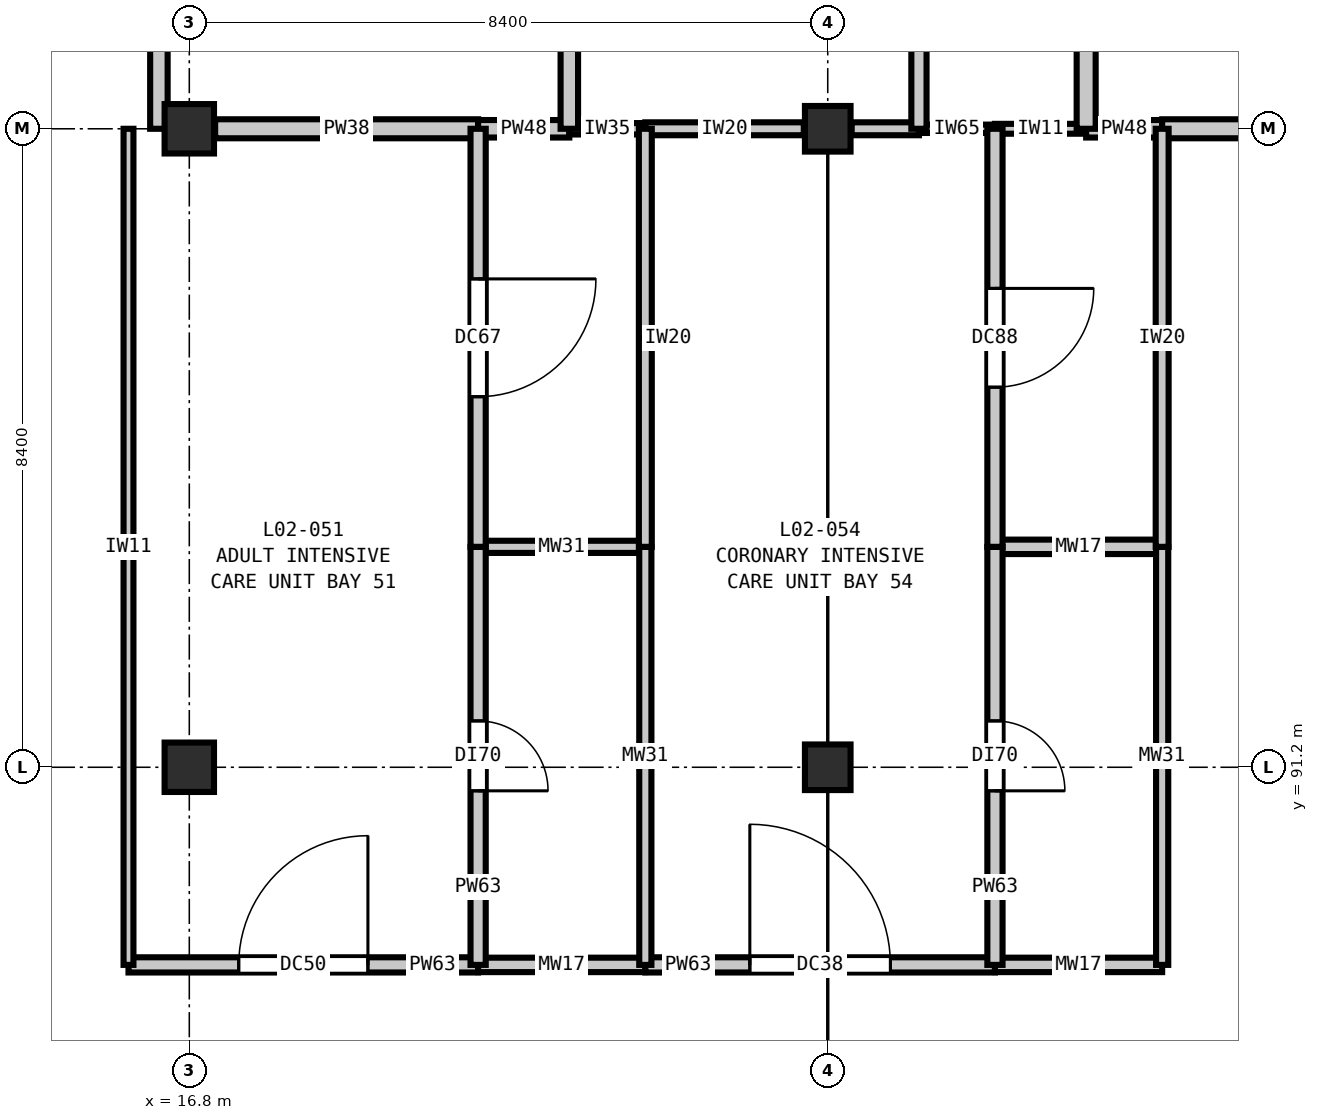
"""IFC4 building model, lengths in metres.
Left out: names, types, materials, properties, quantities, classifications, styles, units other than length and angle.
Written with IfcOpenShell. Run it as: python <this file> out.ifc"""

import sys

from ifc_helpers import new_model, si_unit, direction, frame, frame_2d, origin, origin_2d, place, context, subcontext, project, spatial, rectangle, extrude, element, fill, save


model = new_model("IFC4")
c1 = context("Model", 3, precision=1e-05, world=origin(), true_north=direction((0.0, 1.0)))
c2 = subcontext(c1, "Body", "Model", "MODEL_VIEW")
j1 = project(units=[si_unit("LENGTHUNIT", "METRE"), si_unit("PLANEANGLEUNIT", "RADIAN")], contexts=[c1])
p1 = place(None, origin())
s1 = spatial("IfcSite", under=j1, at=p1, CompositionType="ELEMENT")
p2 = place(p1, origin())
s2 = spatial("IfcBuilding", under=s1, at=p2, CompositionType="ELEMENT")
p3 = place(p2, frame((0.0, 0.0, 10.8)))
s3 = spatial("IfcBuildingStorey", under=s2, at=p3, CompositionType="ELEMENT", Elevation=10.8)
for number, where, z_axis, x_axis in (
    (1, (16.8, 91.2, 0.0), (0.0, 0.0, 1.0), (1.0, 0.0, 0.0)),
    (2, (16.8, 99.6, 0.0), (0.0, 0.0, 1.0), (1.0, 0.0, 0.0)),
):
    element("IfcColumn", number, at=place(p3, frame(where, z_axis=z_axis, x_axis=x_axis)), inside=s3, PredefinedType="COLUMN", context=c2, shape_type="SweptSolid", body=[
        extrude(rectangle(XDim=0.65, YDim=0.65, at=origin_2d()), origin(), (0.0, 0.0, 1.0), 5.4),
    ])
for number, where, z_axis, x_axis in (
    (3, (25.2, 91.2, 0.0), (0.0, 0.0, 1.0), (1.0, 0.0, 0.0)),
    (4, (25.2, 99.6, 0.0), (0.0, 0.0, 1.0), (1.0, 0.0, 0.0)),
):
    element("IfcColumn", number, at=place(p3, frame(where, z_axis=z_axis, x_axis=x_axis)), inside=s3, PredefinedType="COLUMN", context=c2, shape_type="SweptSolid", body=[
        extrude(rectangle(XDim=0.6, YDim=0.6, at=origin_2d()), origin(), (0.0, 0.0, 1.0), 5.4),
    ])
p4 = place(p3, frame((16.0, 88.6, 0.0), z_axis=(0.0, 0.0, 1.0), x_axis=(1.0, 0.0, 0.0)))
e5 = element("IfcWall", 5, at=p4, inside=s3, PredefinedType="PARTITIONING", context=c2, shape_type="SweptSolid", body=[
    extrude(rectangle(XDim=4.6, YDim=0.2, at=frame_2d((2.3, 0.0))), origin(), (0.0, 0.0, 1.0), 5.07),
])
p5 = place(p4, frame((1.45, 0.0, 0.0)))
e6 = element("IfcOpeningElement", 6, at=p5, cuts=e5, PredefinedType="OPENING", context=c2, shape_type="SweptSolid", body=[
    extrude(rectangle(XDim=1.7, YDim=2.3, at=frame_2d((0.85, 1.15))), frame((0.0, 0.11, 0.0), z_axis=(0.0, -1.0, 0.0), x_axis=(1.0, 0.0, 0.0)), (0.0, 0.0, 1.0), 0.22),
])
p6 = place(p3, frame((20.6, 88.6, 0.0), z_axis=(0.0, 0.0, 1.0), x_axis=(1.0, 0.0, 0.0)))
e7 = element("IfcWall", 7, at=p6, inside=s3, PredefinedType="PLUMBINGWALL", context=c2, shape_type="SweptSolid", body=[
    extrude(rectangle(XDim=2.2, YDim=0.19, at=frame_2d((1.1, 0.0))), origin(), (0.0, 0.0, 1.0), 5.07),
])
p7 = place(p3, frame((22.8, 88.6, 0.0), z_axis=(0.0, 0.0, 1.0), x_axis=(1.0, 0.0, 0.0)))
e8 = element("IfcWall", 8, at=p7, inside=s3, PredefinedType="PARTITIONING", context=c2, shape_type="SweptSolid", body=[
    extrude(rectangle(XDim=4.6, YDim=0.2, at=frame_2d((2.3, 0.0))), origin(), (0.0, 0.0, 1.0), 5.07),
])
p8 = place(p7, frame((1.375, 0.0, 0.0)))
e9 = element("IfcOpeningElement", 9, at=p8, cuts=e8, PredefinedType="OPENING", context=c2, shape_type="SweptSolid", body=[
    extrude(rectangle(XDim=1.85, YDim=2.3, at=frame_2d((0.925, 1.15))), frame((0.0, 0.11, 0.0), z_axis=(0.0, -1.0, 0.0), x_axis=(1.0, 0.0, 0.0)), (0.0, 0.0, 1.0), 0.22),
])
p9 = place(p3, frame((27.4, 88.6, 0.0), z_axis=(0.0, 0.0, 1.0), x_axis=(1.0, 0.0, 0.0)))
e10 = element("IfcWall", 10, at=p9, inside=s3, PredefinedType="PLUMBINGWALL", context=c2, shape_type="SweptSolid", body=[
    extrude(rectangle(XDim=2.2, YDim=0.19, at=frame_2d((1.1, 0.0))), origin(), (0.0, 0.0, 1.0), 5.07),
])
p10 = place(p3, frame((20.6, 94.1, 0.0), z_axis=(0.0, 0.0, 1.0), x_axis=(1.0, 0.0, 0.0)))
e11 = element("IfcWall", 11, at=p10, inside=s3, PredefinedType="PLUMBINGWALL", context=c2, shape_type="SweptSolid", body=[
    extrude(rectangle(XDim=2.2, YDim=0.16, at=frame_2d((1.1, 0.0))), origin(), (0.0, 0.0, 1.0), 5.07),
])
p11 = place(p3, frame((27.4, 94.1, 0.0), z_axis=(0.0, 0.0, 1.0), x_axis=(1.0, 0.0, 0.0)))
e12 = element("IfcWall", 12, at=p11, inside=s3, PredefinedType="PLUMBINGWALL", context=c2, shape_type="SweptSolid", body=[
    extrude(rectangle(XDim=2.2, YDim=0.19, at=frame_2d((1.1, 0.0))), origin(), (0.0, 0.0, 1.0), 5.07),
])
p12 = place(p3, frame((17.14, 99.6, 0.0), z_axis=(0.0, 0.0, 1.0), x_axis=(1.0, 0.0, 0.0)))
e13 = element("IfcWall", 13, at=p12, inside=s3, PredefinedType="PARTITIONING", context=c2, shape_type="SweptSolid", body=[
    extrude(rectangle(XDim=3.46, YDim=0.25, at=frame_2d((1.73, 0.0))), origin(), (0.0, 0.0, 1.0), 4.735),
])
p13 = place(p3, frame((20.6, 99.6, 0.0), z_axis=(0.0, 0.0, 1.0), x_axis=(1.0, 0.0, 0.0)))
e14 = element("IfcWall", 14, at=p13, inside=s3, PredefinedType="PARTITIONING", context=c2, shape_type="SweptSolid", body=[
    extrude(rectangle(XDim=1.2, YDim=0.23, at=frame_2d((0.6, 0.0))), origin(), (0.0, 0.0, 1.0), 4.735),
])
p14 = place(p3, frame((21.8, 99.6, 0.0), z_axis=(0.0, 0.0, 1.0), x_axis=(1.0, 0.0, 0.0)))
e15 = element("IfcWall", 15, at=p14, inside=s3, PredefinedType="PARTITIONING", context=c2, shape_type="SweptSolid", body=[
    extrude(rectangle(XDim=1.0, YDim=0.15, at=frame_2d((0.5, 0.0))), origin(), (0.0, 0.0, 1.0), 4.735),
])
p15 = place(p3, frame((22.8, 99.6, 0.0), z_axis=(0.0, 0.0, 1.0), x_axis=(1.0, 0.0, 0.0)))
e16 = element("IfcWall", 16, at=p15, inside=s3, PredefinedType="PARTITIONING", context=c2, shape_type="SweptSolid", body=[
    extrude(rectangle(XDim=2.085, YDim=0.17, at=frame_2d((1.042, 0.0))), origin(), (0.0, 0.0, 1.0), 4.735),
])
p16 = place(p3, frame((25.515, 99.6, 0.0), z_axis=(0.0, 0.0, 1.0), x_axis=(1.0, 0.0, 0.0)))
e17 = element("IfcWall", 17, at=p16, inside=s3, PredefinedType="PARTITIONING", context=c2, shape_type="SweptSolid", body=[
    extrude(rectangle(XDim=0.885, YDim=0.17, at=frame_2d((0.442, 0.0))), origin(), (0.0, 0.0, 1.0), 4.735),
])
p17 = place(p3, frame((26.4, 99.6, 0.0), z_axis=(0.0, 0.0, 1.0), x_axis=(1.0, 0.0, 0.0)))
e18 = element("IfcWall", 18, at=p17, inside=s3, PredefinedType="PARTITIONING", context=c2, shape_type="SweptSolid", body=[
    extrude(rectangle(XDim=1.0, YDim=0.11, at=frame_2d((0.5, 0.0))), origin(), (0.0, 0.0, 1.0), 4.735),
])
p18 = place(p3, frame((27.4, 99.6, 0.0), z_axis=(0.0, 0.0, 1.0), x_axis=(1.0, 0.0, 0.0)))
e19 = element("IfcWall", 19, at=p18, inside=s3, PredefinedType="PARTITIONING", context=c2, shape_type="SweptSolid", body=[
    extrude(rectangle(XDim=1.2, YDim=0.13, at=frame_2d((0.6, 0.0))), origin(), (0.0, 0.0, 1.0), 4.735),
])
p19 = place(p3, frame((28.6, 99.6, 0.0), z_axis=(0.0, 0.0, 1.0), x_axis=(1.0, 0.0, 0.0)))
e20 = element("IfcWall", 20, at=p19, inside=s3, PredefinedType="PARTITIONING", context=c2, shape_type="SweptSolid", body=[
    extrude(rectangle(XDim=1.0, YDim=0.23, at=frame_2d((0.5, 0.0))), origin(), (0.0, 0.0, 1.0), 4.735),
])
p20 = place(p3, frame((29.6, 99.6, 0.0), z_axis=(0.0, 0.0, 1.0), x_axis=(1.0, 0.0, 0.0)))
e21 = element("IfcWall", 21, at=p20, inside=s3, PredefinedType="PARTITIONING", context=c2, shape_type="SweptSolid", body=[
    extrude(rectangle(XDim=3.685, YDim=0.25, at=frame_2d((1.842, 0.0))), origin(), (0.0, 0.0, 1.0), 4.735),
])
p21 = place(p3, frame((16.0, 88.6, 0.0), z_axis=(0.0, 0.0, 1.0), x_axis=(0.0, 1.0, 0.0)))
e22 = element("IfcWall", 22, at=p21, inside=s3, PredefinedType="PARTITIONING", context=c2, shape_type="SweptSolid", body=[
    extrude(rectangle(XDim=11.0, YDim=0.13, at=frame_2d((5.5, 0.0))), origin(), (0.0, 0.0, 1.0), 5.07),
])
p22 = place(p3, frame((16.4, 99.6, 0.0), z_axis=(0.0, 0.0, 1.0), x_axis=(0.0, 1.0, 0.0)))
e23 = element("IfcWall", 23, at=p22, inside=s3, PredefinedType="PARTITIONING", context=c2, shape_type="SweptSolid", body=[
    extrude(rectangle(XDim=13.6, YDim=0.23, at=frame_2d((6.8, 0.0))), origin(), (0.0, 0.0, 1.0), 5.07),
])
p23 = place(p3, frame((20.6, 88.6, 0.0), z_axis=(0.0, 0.0, 1.0), x_axis=(0.0, 1.0, 0.0)))
e24 = element("IfcWall", 24, at=p23, inside=s3, PredefinedType="PARTITIONING", context=c2, shape_type="SweptSolid", body=[
    extrude(rectangle(XDim=5.5, YDim=0.2, at=frame_2d((2.75, 0.0))), origin(), (0.0, 0.0, 1.0), 5.07),
])
p24 = place(p23, frame((2.29, 0.0, 0.0)))
e25 = element("IfcOpeningElement", 25, at=p24, cuts=e24, PredefinedType="OPENING", context=c2, shape_type="SweptSolid", body=[
    extrude(rectangle(XDim=0.92, YDim=2.1, at=frame_2d((0.46, 1.05))), frame((0.0, 0.11, 0.0), z_axis=(0.0, -1.0, 0.0), x_axis=(1.0, 0.0, 0.0)), (0.0, 0.0, 1.0), 0.22),
])
p25 = place(p3, frame((20.6, 94.1, 0.0), z_axis=(0.0, 0.0, 1.0), x_axis=(0.0, 1.0, 0.0)))
e26 = element("IfcWall", 26, at=p25, inside=s3, PredefinedType="PARTITIONING", context=c2, shape_type="SweptSolid", body=[
    extrude(rectangle(XDim=5.5, YDim=0.2, at=frame_2d((2.75, 0.0))), origin(), (0.0, 0.0, 1.0), 5.07),
])
p26 = place(p25, frame((1.975, 0.0, 0.0)))
e27 = element("IfcOpeningElement", 27, at=p26, cuts=e26, PredefinedType="OPENING", context=c2, shape_type="SweptSolid", body=[
    extrude(rectangle(XDim=1.55, YDim=2.25, at=frame_2d((0.775, 1.125))), frame((0.0, 0.11, 0.0), z_axis=(0.0, -1.0, 0.0), x_axis=(1.0, 0.0, 0.0)), (0.0, 0.0, 1.0), 0.22),
])
p27 = place(p3, frame((21.8, 99.6, 0.0), z_axis=(0.0, 0.0, 1.0), x_axis=(0.0, 1.0, 0.0)))
e28 = element("IfcWall", 28, at=p27, inside=s3, PredefinedType="PARTITIONING", context=c2, shape_type="SweptSolid", body=[
    extrude(rectangle(XDim=13.6, YDim=0.23, at=frame_2d((6.8, 0.0))), origin(), (0.0, 0.0, 1.0), 5.07),
])
p28 = place(p3, frame((22.8, 88.6, 0.0), z_axis=(0.0, 0.0, 1.0), x_axis=(0.0, 1.0, 0.0)))
e29 = element("IfcWall", 29, at=p28, inside=s3, PredefinedType="PLUMBINGWALL", context=c2, shape_type="SweptSolid", body=[
    extrude(rectangle(XDim=5.5, YDim=0.16, at=frame_2d((2.75, 0.0))), origin(), (0.0, 0.0, 1.0), 5.07),
])
p29 = place(p3, frame((22.8, 94.1, 0.0), z_axis=(0.0, 0.0, 1.0), x_axis=(0.0, 1.0, 0.0)))
e30 = element("IfcWall", 30, at=p29, inside=s3, PredefinedType="PARTITIONING", context=c2, shape_type="SweptSolid", body=[
    extrude(rectangle(XDim=5.5, YDim=0.17, at=frame_2d((2.75, 0.0))), origin(), (0.0, 0.0, 1.0), 5.07),
])
p30 = place(p3, frame((26.4, 99.6, 0.0), z_axis=(0.0, 0.0, 1.0), x_axis=(0.0, 1.0, 0.0)))
e31 = element("IfcWall", 31, at=p30, inside=s3, PredefinedType="PARTITIONING", context=c2, shape_type="SweptSolid", body=[
    extrude(rectangle(XDim=6.8, YDim=0.2, at=frame_2d((3.4, 0.0))), origin(), (0.0, 0.0, 1.0), 5.07),
])
p31 = place(p30, frame((3.936, 0.0, 0.0)))
e32 = element("IfcOpeningElement", 32, at=p31, cuts=e31, PredefinedType="OPENING", context=c2, shape_type="SweptSolid", body=[
    extrude(rectangle(XDim=1.7, YDim=2.3, at=frame_2d((0.85, 1.15))), frame((0.0, 0.11, 0.0), z_axis=(0.0, -1.0, 0.0), x_axis=(1.0, 0.0, 0.0)), (0.0, 0.0, 1.0), 0.22),
])
p32 = place(p3, frame((27.4, 88.6, 0.0), z_axis=(0.0, 0.0, 1.0), x_axis=(0.0, 1.0, 0.0)))
e33 = element("IfcWall", 33, at=p32, inside=s3, PredefinedType="PARTITIONING", context=c2, shape_type="SweptSolid", body=[
    extrude(rectangle(XDim=5.5, YDim=0.2, at=frame_2d((2.75, 0.0))), origin(), (0.0, 0.0, 1.0), 5.07),
])
p33 = place(p32, frame((2.29, 0.0, 0.0)))
e34 = element("IfcOpeningElement", 34, at=p33, cuts=e33, PredefinedType="OPENING", context=c2, shape_type="SweptSolid", body=[
    extrude(rectangle(XDim=0.92, YDim=2.1, at=frame_2d((0.46, 1.05))), frame((0.0, 0.11, 0.0), z_axis=(0.0, -1.0, 0.0), x_axis=(1.0, 0.0, 0.0)), (0.0, 0.0, 1.0), 0.22),
])
p34 = place(p3, frame((27.4, 94.1, 0.0), z_axis=(0.0, 0.0, 1.0), x_axis=(0.0, 1.0, 0.0)))
e35 = element("IfcWall", 35, at=p34, inside=s3, PredefinedType="PARTITIONING", context=c2, shape_type="SweptSolid", body=[
    extrude(rectangle(XDim=5.5, YDim=0.2, at=frame_2d((2.75, 0.0))), origin(), (0.0, 0.0, 1.0), 5.07),
])
p35 = place(p34, frame((2.1, 0.0, 0.0)))
e36 = element("IfcOpeningElement", 36, at=p35, cuts=e35, PredefinedType="OPENING", context=c2, shape_type="SweptSolid", body=[
    extrude(rectangle(XDim=1.3, YDim=2.2, at=frame_2d((0.65, 1.1))), frame((0.0, 0.11, 0.0), z_axis=(0.0, -1.0, 0.0), x_axis=(1.0, 0.0, 0.0)), (0.0, 0.0, 1.0), 0.22),
])
p36 = place(p3, frame((28.6, 99.6, 0.0), z_axis=(0.0, 0.0, 1.0), x_axis=(0.0, 1.0, 0.0)))
e37 = element("IfcWall", 37, at=p36, inside=s3, PredefinedType="PARTITIONING", context=c2, shape_type="SweptSolid", body=[
    extrude(rectangle(XDim=6.8, YDim=0.25, at=frame_2d((3.4, 0.0))), origin(), (0.0, 0.0, 1.0), 5.07),
])
p37 = place(p3, frame((29.6, 88.6, 0.0), z_axis=(0.0, 0.0, 1.0), x_axis=(0.0, 1.0, 0.0)))
e38 = element("IfcWall", 38, at=p37, inside=s3, PredefinedType="PLUMBINGWALL", context=c2, shape_type="SweptSolid", body=[
    extrude(rectangle(XDim=5.5, YDim=0.16, at=frame_2d((2.75, 0.0))), origin(), (0.0, 0.0, 1.0), 5.07),
])
p38 = place(p3, frame((29.6, 94.1, 0.0), z_axis=(0.0, 0.0, 1.0), x_axis=(0.0, 1.0, 0.0)))
e39 = element("IfcWall", 39, at=p38, inside=s3, PredefinedType="PARTITIONING", context=c2, shape_type="SweptSolid", body=[
    extrude(rectangle(XDim=5.5, YDim=0.17, at=frame_2d((2.75, 0.0))), origin(), (0.0, 0.0, 1.0), 5.07),
])
p39 = place(p5, origin())
e40 = element("IfcDoor", 40, at=p39, inside=s3, OperationType="SINGLE_SWING_RIGHT", PredefinedType="DOOR", context=c2, shape_type="SweptSolid", body=[
    extrude(rectangle(XDim=1.7, YDim=2.3, at=frame_2d((0.85, 1.15))), frame((0.0, 0.025, 0.0), z_axis=(0.0, -1.0, 0.0), x_axis=(1.0, 0.0, 0.0)), (0.0, 0.0, 1.0), 0.05),
])
fill(e6, e40)
p40 = place(p8, origin())
e41 = element("IfcDoor", 41, at=p40, inside=s3, OperationType="SINGLE_SWING_LEFT", PredefinedType="DOOR", context=c2, shape_type="SweptSolid", body=[
    extrude(rectangle(XDim=1.85, YDim=2.3, at=frame_2d((0.925, 1.15))), frame((0.0, 0.025, 0.0), z_axis=(0.0, -1.0, 0.0), x_axis=(1.0, 0.0, 0.0)), (0.0, 0.0, 1.0), 0.05),
])
fill(e9, e41)
p41 = place(p24, frame((0.92, 0.0, 0.0), z_axis=(0.0, 0.0, 1.0), x_axis=(-1.0, 0.0, 0.0)))
e42 = element("IfcDoor", 42, at=p41, inside=s3, OperationType="SINGLE_SWING_RIGHT", PredefinedType="DOOR", context=c2, shape_type="SweptSolid", body=[
    extrude(rectangle(XDim=0.92, YDim=2.1, at=frame_2d((0.46, 1.05))), frame((0.0, 0.025, 0.0), z_axis=(0.0, -1.0, 0.0), x_axis=(1.0, 0.0, 0.0)), (0.0, 0.0, 1.0), 0.05),
])
fill(e25, e42)
p42 = place(p26, frame((1.55, 0.0, 0.0), z_axis=(0.0, 0.0, 1.0), x_axis=(-1.0, 0.0, 0.0)))
e43 = element("IfcDoor", 43, at=p42, inside=s3, OperationType="SINGLE_SWING_LEFT", PredefinedType="DOOR", context=c2, shape_type="SweptSolid", body=[
    extrude(rectangle(XDim=1.55, YDim=2.25, at=frame_2d((0.775, 1.125))), frame((0.0, 0.025, 0.0), z_axis=(0.0, -1.0, 0.0), x_axis=(1.0, 0.0, 0.0)), (0.0, 0.0, 1.0), 0.05),
])
fill(e27, e43)
p43 = place(p33, frame((0.92, 0.0, 0.0), z_axis=(0.0, 0.0, 1.0), x_axis=(-1.0, 0.0, 0.0)))
e44 = element("IfcDoor", 44, at=p43, inside=s3, OperationType="SINGLE_SWING_RIGHT", PredefinedType="DOOR", context=c2, shape_type="SweptSolid", body=[
    extrude(rectangle(XDim=0.92, YDim=2.1, at=frame_2d((0.46, 1.05))), frame((0.0, 0.025, 0.0), z_axis=(0.0, -1.0, 0.0), x_axis=(1.0, 0.0, 0.0)), (0.0, 0.0, 1.0), 0.05),
])
fill(e34, e44)
p44 = place(p35, frame((1.3, 0.0, 0.0), z_axis=(0.0, 0.0, 1.0), x_axis=(-1.0, 0.0, 0.0)))
e45 = element("IfcDoor", 45, at=p44, inside=s3, OperationType="SINGLE_SWING_LEFT", PredefinedType="DOOR", context=c2, shape_type="SweptSolid", body=[
    extrude(rectangle(XDim=1.3, YDim=2.2, at=frame_2d((0.65, 1.1))), frame((0.0, 0.025, 0.0), z_axis=(0.0, -1.0, 0.0), x_axis=(1.0, 0.0, 0.0)), (0.0, 0.0, 1.0), 0.05),
])
fill(e36, e45)
save(model, sys.argv[1])
